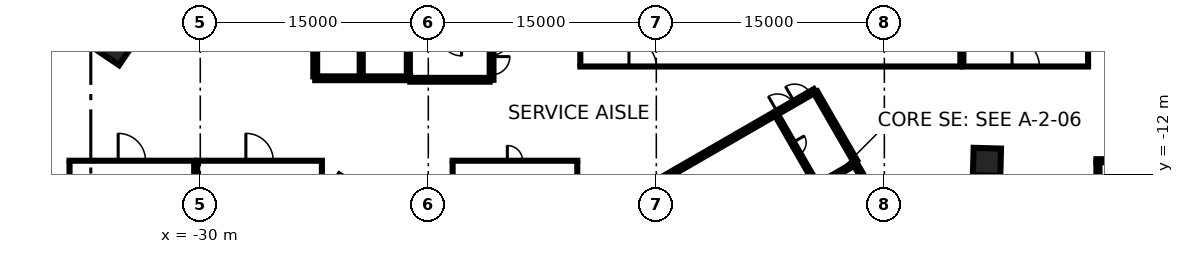
"""IFC4 building model, lengths in metres.
Left out: names, types, materials, properties, quantities, classifications, styles, units other than length and angle.
Written with IfcOpenShell. Run it as: python <this file> out.ifc"""

import sys

from ifc_helpers import new_model, si_unit, direction, frame, frame_2d, origin, origin_2d, place, context, subcontext, project, spatial, rectangle, extrude, element, fill, save


model = new_model("IFC4")
c1 = context("Model", 3, precision=1e-05, world=origin(), true_north=direction((0.0, 1.0)))
c2 = subcontext(c1, "Body", "Model", "MODEL_VIEW")
j1 = project(units=[si_unit("LENGTHUNIT", "METRE"), si_unit("PLANEANGLEUNIT", "RADIAN")], contexts=[c1])
p1 = place(None, origin())
s1 = spatial("IfcSite", under=j1, at=p1, CompositionType="ELEMENT")
p2 = place(p1, origin())
s2 = spatial("IfcBuilding", under=s1, at=p2, CompositionType="ELEMENT")
p3 = place(p2, frame((0.0, 0.0, -7.2)))
s3 = spatial("IfcBuildingStorey", under=s2, at=p3, CompositionType="ELEMENT", Elevation=-7.2)
for number, where, z_axis, x_axis in (
    (1, (21.749, -11.174, -0.4), (0.0, 0.0, 1.0), (-1.0, 0.027, 0.0)),
    (2, (-35.583, -3.565, -0.4), (0.0, 0.0, 1.0), (0.559, 0.829, 0.0)),
):
    element("IfcColumn", number, at=place(p3, frame(where, z_axis=z_axis, x_axis=x_axis)), inside=s3, PredefinedType="COLUMN", context=c2, shape_type="SweptSolid", body=[
        extrude(rectangle(XDim=1.8, YDim=1.8, at=origin_2d()), origin(), (0.0, 0.0, 1.0), 3.6),
    ])
p4 = place(p3, frame((-10.837, 5.775, 0.0), z_axis=(0.0, 0.0, 1.0), x_axis=(0.0, -1.0, 0.0)))
e3 = element("IfcWall", 3, at=p4, inside=s3, PredefinedType="SHEAR", context=c2, shape_type="SweptSolid", body=[
    extrude(rectangle(XDim=11.55, YDim=0.25, at=frame_2d((5.775, 0.0))), origin(), (0.0, 0.0, 1.0), 3.2),
])
p5 = place(p4, frame((10.025, 0.0, 0.0)))
e4 = element("IfcOpeningElement", 4, at=p5, cuts=e3, PredefinedType="OPENING", context=c2, shape_type="SweptSolid", body=[
    extrude(rectangle(XDim=1.2, YDim=2.1, at=frame_2d((0.6, 1.05))), frame((0.0, 0.135, 0.0), z_axis=(0.0, -1.0, 0.0), x_axis=(1.0, 0.0, 0.0)), (0.0, 0.0, 1.0), 0.27),
])
p6 = place(p4, frame((8.725, 0.0, 0.0)))
e5 = element("IfcOpeningElement", 5, at=p6, cuts=e3, PredefinedType="OPENING", context=c2, shape_type="SweptSolid", body=[
    extrude(rectangle(XDim=1.2, YDim=2.1, at=frame_2d((0.6, 1.05))), frame((0.0, 0.135, 0.0), z_axis=(0.0, -1.0, 0.0), x_axis=(1.0, 0.0, 0.0)), (0.0, 0.0, 1.0), 0.27),
])
p7 = place(p3, frame((-16.187, -5.675, 0.0), z_axis=(0.0, 0.0, 1.0), x_axis=(-1.0, 0.0, 0.0)))
e6 = element("IfcWall", 6, at=p7, inside=s3, PredefinedType="SHEAR", context=c2, shape_type="SweptSolid", body=[
    extrude(rectangle(XDim=6.25, YDim=0.25, at=frame_2d((3.125, 0.0))), origin(), (0.0, 0.0, 1.0), 3.2),
])
p8 = place(p3, frame((-10.963, -5.775, 0.0), z_axis=(0.0, 0.0, 1.0), x_axis=(-1.0, 0.0, 0.0)))
e7 = element("IfcWall", 7, at=p8, inside=s3, PredefinedType="SHEAR", context=c2, shape_type="SweptSolid", body=[
    extrude(rectangle(XDim=5.225, YDim=0.25, at=frame_2d((2.612, 0.0))), origin(), (0.0, 0.0, 1.0), 3.2),
])
p9 = place(p3, frame((-22.437, -5.55, 0.0), z_axis=(0.0, 0.0, 1.0), x_axis=(0.0, 1.0, 0.0)))
e8 = element("IfcWall", 8, at=p9, inside=s3, PredefinedType="SHEAR", context=c2, shape_type="SweptSolid", body=[
    extrude(rectangle(XDim=1.849, YDim=0.25, at=frame_2d((0.925, 0.0))), origin(), (0.0, 0.0, 1.0), 3.2),
])
p10 = place(p3, frame((-16.312, -2.807, 0.0), z_axis=(0.0, 0.0, 1.0), x_axis=(0.0, -1.0, 0.0)))
e9 = element("IfcWall", 9, at=p10, inside=s3, PredefinedType="SHEAR", context=c2, shape_type="SweptSolid", body=[
    extrude(rectangle(XDim=2.742, YDim=0.2, at=frame_2d((1.371, 0.0))), origin(), (0.0, 0.0, 1.0), 3.2),
])
p11 = place(p10, frame((0.743, 0.0, 0.0)))
e10 = element("IfcOpeningElement", 10, at=p11, cuts=e9, PredefinedType="OPENING", context=c2, shape_type="SweptSolid", body=[
    extrude(rectangle(XDim=1.3, YDim=2.1, at=frame_2d((0.65, 1.05))), frame((0.0, 0.11, 0.0), z_axis=(0.0, -1.0, 0.0), x_axis=(1.0, 0.0, 0.0)), (0.0, 0.0, 1.0), 0.22),
])
p12 = place(p3, frame((-19.412, -5.549, 0.0), z_axis=(0.0, 0.0, 1.0), x_axis=(0.0, 1.0, 0.0)))
e11 = element("IfcWall", 11, at=p12, inside=s3, PredefinedType="SHEAR", context=c2, shape_type="SweptSolid", body=[
    extrude(rectangle(XDim=2.799, YDim=0.2, at=frame_2d((1.399, 0.0))), origin(), (0.0, 0.0, 1.0), 3.2),
])
p13 = place(p3, frame((0.417, -12.273, 0.0), z_axis=(0.0, 0.0, 1.0), x_axis=(0.866021906294, 0.500006057782, 0.0)))
e12 = element("IfcWall", 12, at=p13, inside=s3, PredefinedType="SHEAR", context=c2, shape_type="SweptSolid", body=[
    extrude(rectangle(XDim=11.55, YDim=0.25, at=frame_2d((5.775, 0.0))), origin(), (0.0, 0.0, 1.0), 3.2),
])
p14 = place(p13, frame((10.025, 0.0, 0.0)))
e13 = element("IfcOpeningElement", 13, at=p14, cuts=e12, PredefinedType="OPENING", context=c2, shape_type="SweptSolid", body=[
    extrude(rectangle(XDim=1.2, YDim=2.1, at=frame_2d((0.6, 1.05))), frame((0.0, 0.135, 0.0), z_axis=(0.0, -1.0, 0.0), x_axis=(1.0, 0.0, 0.0)), (0.0, 0.0, 1.0), 0.27),
])
p15 = place(p13, frame((8.725, 0.0, 0.0)))
e14 = element("IfcOpeningElement", 14, at=p15, cuts=e12, PredefinedType="OPENING", context=c2, shape_type="SweptSolid", body=[
    extrude(rectangle(XDim=1.2, YDim=2.1, at=frame_2d((0.6, 1.05))), frame((0.0, 0.135, 0.0), z_axis=(0.0, -1.0, 0.0), x_axis=(1.0, 0.0, 0.0)), (0.0, 0.0, 1.0), 0.27),
])
p16 = place(p3, frame((13.008, -11.181, 0.0), z_axis=(0.0, 0.0, 1.0), x_axis=(0.500004234368, -0.866022959057, 0.0)))
e15 = element("IfcWall", 15, at=p16, inside=s3, PredefinedType="SHEAR", context=c2, shape_type="SweptSolid", body=[
    extrude(rectangle(XDim=6.25, YDim=0.25, at=frame_2d((3.125, 0.0))), origin(), (0.0, 0.0, 1.0), 3.2),
])
p17 = place(p3, frame((10.483, -6.606, 0.0), z_axis=(0.0, 0.0, 1.0), x_axis=(0.49999885962, -0.866026062182, 0.0)))
e16 = element("IfcWall", 16, at=p17, inside=s3, PredefinedType="SHEAR", context=c2, shape_type="SweptSolid", body=[
    extrude(rectangle(XDim=5.225, YDim=0.25, at=frame_2d((2.612, 0.0))), origin(), (0.0, 0.0, 1.0), 3.2),
])
p18 = place(p3, frame((7.906, -8.094, 0.0), z_axis=(0.0, 0.0, 1.0), x_axis=(0.500012186204, -0.866018367962, 0.0)))
e17 = element("IfcWall", 17, at=p18, inside=s3, PredefinedType="SHEAR", context=c2, shape_type="SweptSolid", body=[
    extrude(rectangle(XDim=5.349, YDim=0.2, at=frame_2d((2.674, 0.0))), origin(), (0.0, 0.0, 1.0), 3.2),
])
p19 = place(p18, frame((2.099, 0.0, 0.0)))
e18 = element("IfcOpeningElement", 18, at=p19, cuts=e17, PredefinedType="OPENING", context=c2, shape_type="SweptSolid", body=[
    extrude(rectangle(XDim=0.9, YDim=2.1, at=frame_2d((0.45, 1.05))), frame((0.0, 0.11, 0.0), z_axis=(0.0, -1.0, 0.0), x_axis=(1.0, 0.0, 0.0)), (0.0, 0.0, 1.0), 0.22),
])
p20 = place(p3, frame((10.668, -12.677, 0.0), z_axis=(0.0, 0.0, 1.0), x_axis=(0.866016748302, 0.500014991436, 0.0)))
e19 = element("IfcWall", 19, at=p20, inside=s3, PredefinedType="SHEAR", context=c2, shape_type="SweptSolid", body=[
    extrude(rectangle(XDim=2.649, YDim=0.2, at=frame_2d((1.324, 0.0))), origin(), (0.0, 0.0, 1.0), 3.2),
])
p21 = place(p20, frame((0.65, 0.0, 0.0)))
e20 = element("IfcOpeningElement", 20, at=p21, cuts=e19, PredefinedType="OPENING", context=c2, shape_type="SweptSolid", body=[
    extrude(rectangle(XDim=1.3, YDim=2.1, at=frame_2d((0.65, 1.05))), frame((0.0, 0.11, 0.0), z_axis=(0.0, -1.0, 0.0), x_axis=(1.0, 0.0, 0.0)), (0.0, 0.0, 1.0), 0.22),
])
p22 = place(p3, frame((-38.7, -11.1, 0.0), z_axis=(0.0, 0.0, 1.0), x_axis=(1.0, 0.0, 0.0)))
e21 = element("IfcWall", 21, at=p22, inside=s3, PredefinedType="PARTITIONING", context=c2, shape_type="SweptSolid", body=[
    extrude(rectangle(XDim=8.4, YDim=0.2, at=frame_2d((4.2, 0.0))), origin(), (0.0, 0.0, 1.0), 3.2),
])
p23 = place(p22, frame((3.3, 0.0, 0.0)))
e22 = element("IfcOpeningElement", 22, at=p23, cuts=e21, PredefinedType="OPENING", context=c2, shape_type="SweptSolid", body=[
    extrude(rectangle(XDim=1.8, YDim=2.1, at=frame_2d((0.9, 1.05))), frame((0.0, 0.11, 0.0), z_axis=(0.0, -1.0, 0.0), x_axis=(1.0, 0.0, 0.0)), (0.0, 0.0, 1.0), 0.22),
])
p24 = place(p3, frame((-38.6, -15.4, 0.0), z_axis=(0.0, 0.0, 1.0), x_axis=(0.0, 1.0, 0.0)))
e23 = element("IfcWall", 23, at=p24, inside=s3, PredefinedType="PARTITIONING", context=c2, shape_type="SweptSolid", body=[
    extrude(rectangle(XDim=4.2, YDim=0.2, at=frame_2d((2.1, 0.0))), origin(), (0.0, 0.0, 1.0), 3.2),
])
p25 = place(p3, frame((-30.4, -15.6, 0.0), z_axis=(0.0, 0.0, 1.0), x_axis=(0.0, 1.0, 0.0)))
e24 = element("IfcWall", 24, at=p25, inside=s3, PredefinedType="PARTITIONING", context=c2, shape_type="SweptSolid", body=[
    extrude(rectangle(XDim=4.4, YDim=0.2, at=frame_2d((2.2, 0.0))), origin(), (0.0, 0.0, 1.0), 3.2),
])
p26 = place(p3, frame((-30.3, -11.1, 0.0), z_axis=(0.0, 0.0, 1.0), x_axis=(1.0, 0.0, 0.0)))
e25 = element("IfcWall", 25, at=p26, inside=s3, PredefinedType="PARTITIONING", context=c2, shape_type="SweptSolid", body=[
    extrude(rectangle(XDim=8.4, YDim=0.2, at=frame_2d((4.2, 0.0))), origin(), (0.0, 0.0, 1.0), 3.2),
])
p27 = place(p26, frame((3.3, 0.0, 0.0)))
e26 = element("IfcOpeningElement", 26, at=p27, cuts=e25, PredefinedType="OPENING", context=c2, shape_type="SweptSolid", body=[
    extrude(rectangle(XDim=1.8, YDim=2.1, at=frame_2d((0.9, 1.05))), frame((0.0, 0.11, 0.0), z_axis=(0.0, -1.0, 0.0), x_axis=(1.0, 0.0, 0.0)), (0.0, 0.0, 1.0), 0.22),
])
p28 = place(p3, frame((-30.2, -15.6, 0.0), z_axis=(0.0, 0.0, 1.0), x_axis=(0.0, 1.0, 0.0)))
e27 = element("IfcWall", 27, at=p28, inside=s3, PredefinedType="PARTITIONING", context=c2, shape_type="SweptSolid", body=[
    extrude(rectangle(XDim=4.4, YDim=0.2, at=frame_2d((2.2, 0.0))), origin(), (0.0, 0.0, 1.0), 3.2),
])
p29 = place(p3, frame((-22.0, -15.4, 0.0), z_axis=(0.0, 0.0, 1.0), x_axis=(0.0, 1.0, 0.0)))
e28 = element("IfcWall", 28, at=p29, inside=s3, PredefinedType="PARTITIONING", context=c2, shape_type="SweptSolid", body=[
    extrude(rectangle(XDim=4.2, YDim=0.2, at=frame_2d((2.1, 0.0))), origin(), (0.0, 0.0, 1.0), 3.2),
])
p30 = place(p3, frame((-13.5, -11.1, 0.0), z_axis=(0.0, 0.0, 1.0), x_axis=(1.0, 0.0, 0.0)))
e29 = element("IfcWall", 29, at=p30, inside=s3, PredefinedType="PARTITIONING", context=c2, shape_type="SweptSolid", body=[
    extrude(rectangle(XDim=8.4, YDim=0.2, at=frame_2d((4.2, 0.0))), origin(), (0.0, 0.0, 1.0), 3.2),
])
p31 = place(p30, frame((3.7, 0.0, 0.0)))
e30 = element("IfcOpeningElement", 30, at=p31, cuts=e29, PredefinedType="OPENING", context=c2, shape_type="SweptSolid", body=[
    extrude(rectangle(XDim=1.0, YDim=2.1, at=frame_2d((0.5, 1.05))), frame((0.0, 0.11, 0.0), z_axis=(0.0, -1.0, 0.0), x_axis=(1.0, 0.0, 0.0)), (0.0, 0.0, 1.0), 0.22),
])
for number, where, z_axis, x_axis in (
    (31, (-13.4, -15.4, 0.0), (0.0, 0.0, 1.0), (0.0, 1.0, 0.0)),
    (32, (-5.2, -15.4, 0.0), (0.0, 0.0, 1.0), (0.0, 1.0, 0.0)),
):
    element("IfcWall", number, at=place(p3, frame(where, z_axis=z_axis, x_axis=x_axis)), inside=s3, PredefinedType="PARTITIONING", context=c2, shape_type="SweptSolid", body=[
        extrude(rectangle(XDim=4.2, YDim=0.2, at=frame_2d((2.1, 0.0))), origin(), (0.0, 0.0, 1.0), 3.2),
    ])
p32 = place(p3, frame((-5.1, -4.9, 0.0), z_axis=(0.0, 0.0, 1.0), x_axis=(1.0, 0.0, 0.0)))
e33 = element("IfcWall", 33, at=p32, inside=s3, PredefinedType="PARTITIONING", context=c2, shape_type="SweptSolid", body=[
    extrude(rectangle(XDim=25.2, YDim=0.2, at=frame_2d((12.6, 0.0))), origin(), (0.0, 0.0, 1.0), 3.2),
])
p33 = place(p32, frame((3.3, 0.0, 0.0)))
e34 = element("IfcOpeningElement", 34, at=p33, cuts=e33, PredefinedType="OPENING", context=c2, shape_type="SweptSolid", body=[
    extrude(rectangle(XDim=1.8, YDim=2.1, at=frame_2d((0.9, 1.05))), frame((0.0, 0.11, 0.0), z_axis=(0.0, -1.0, 0.0), x_axis=(1.0, 0.0, 0.0)), (0.0, 0.0, 1.0), 0.22),
])
for number, where, z_axis, x_axis in (
    (35, (-5.0, -4.8, 0.0), (0.0, 0.0, 1.0), (0.0, 1.0, 0.0)),
    (36, (20.0, -4.8, 0.0), (0.0, 0.0, 1.0), (0.0, 1.0, 0.0)),
):
    element("IfcWall", number, at=place(p3, frame(where, z_axis=z_axis, x_axis=x_axis)), inside=s3, PredefinedType="PARTITIONING", context=c2, shape_type="SweptSolid", body=[
        extrude(rectangle(XDim=4.2, YDim=0.2, at=frame_2d((2.1, 0.0))), origin(), (0.0, 0.0, 1.0), 3.2),
    ])
p34 = place(p3, frame((20.1, -4.9, 0.0), z_axis=(0.0, 0.0, 1.0), x_axis=(1.0, 0.0, 0.0)))
e37 = element("IfcWall", 37, at=p34, inside=s3, PredefinedType="PARTITIONING", context=c2, shape_type="SweptSolid", body=[
    extrude(rectangle(XDim=8.4, YDim=0.2, at=frame_2d((4.2, 0.0))), origin(), (0.0, 0.0, 1.0), 3.2),
])
p35 = place(p34, frame((3.3, 0.0, 0.0)))
e38 = element("IfcOpeningElement", 38, at=p35, cuts=e37, PredefinedType="OPENING", context=c2, shape_type="SweptSolid", body=[
    extrude(rectangle(XDim=1.8, YDim=2.1, at=frame_2d((0.9, 1.05))), frame((0.0, 0.11, 0.0), z_axis=(0.0, -1.0, 0.0), x_axis=(1.0, 0.0, 0.0)), (0.0, 0.0, 1.0), 0.22),
])
p36 = place(p3, frame((20.2, -4.8, 0.0), z_axis=(0.0, 0.0, 1.0), x_axis=(0.0, 1.0, 0.0)))
e39 = element("IfcWall", 39, at=p36, inside=s3, PredefinedType="PARTITIONING", context=c2, shape_type="SweptSolid", body=[
    extrude(rectangle(XDim=4.2, YDim=0.2, at=frame_2d((2.1, 0.0))), origin(), (0.0, 0.0, 1.0), 3.2),
])
p37 = place(p3, frame((28.4, -4.8, 0.0), z_axis=(0.0, 0.0, 1.0), x_axis=(0.0, 1.0, 0.0)))
e40 = element("IfcWall", 40, at=p37, inside=s3, PredefinedType="PARTITIONING", context=c2, shape_type="SweptSolid", body=[
    extrude(rectangle(XDim=4.4, YDim=0.2, at=frame_2d((2.2, 0.0))), origin(), (0.0, 0.0, 1.0), 3.2),
])
p38 = place(p3, frame((29.05, -20.8, 0.0), z_axis=(0.0, 0.0, 1.0), x_axis=(0.0, 1.0, 0.0)))
e41 = element("IfcWall", 41, at=p38, inside=s3, PredefinedType="SOLIDWALL", context=c2, shape_type="SweptSolid", body=[
    extrude(rectangle(XDim=9.6, YDim=0.2, at=frame_2d((4.8, 0.0))), origin(), (0.0, 0.0, 1.0), 3.2),
])
p39 = place(p3, frame((28.95, -11.1, 0.0), z_axis=(0.0, 0.0, 1.0), x_axis=(1.0, 0.0, 0.0)))
e42 = element("IfcWall", 42, at=p39, inside=s3, PredefinedType="SOLIDWALL", context=c2, shape_type="SweptSolid", body=[
    extrude(rectangle(XDim=4.55, YDim=0.2, at=frame_2d((2.275, 0.0))), origin(), (0.0, 0.0, 1.0), 3.2),
])
p40 = place(p11, origin())
e43 = element("IfcDoor", 43, at=p40, inside=s3, OperationType="SLIDING_TO_LEFT", PredefinedType="DOOR", context=c2, shape_type="SweptSolid", body=[
    extrude(rectangle(XDim=1.3, YDim=2.1, at=frame_2d((0.65, 1.05))), frame((0.0, 0.025, 0.0), z_axis=(0.0, -1.0, 0.0), x_axis=(1.0, 0.0, 0.0)), (0.0, 0.0, 1.0), 0.05),
])
fill(e10, e43)
p41 = place(p5, origin())
e44 = element("IfcDoor", 44, at=p41, inside=s3, OperationType="SINGLE_SWING_LEFT", PredefinedType="DOOR", context=c2, shape_type="SweptSolid", body=[
    extrude(rectangle(XDim=1.2, YDim=2.1, at=frame_2d((0.6, 1.05))), frame((0.0, 0.025, 0.0), z_axis=(0.0, -1.0, 0.0), x_axis=(1.0, 0.0, 0.0)), (0.0, 0.0, 1.0), 0.05),
])
fill(e4, e44)
p42 = place(p6, origin())
e45 = element("IfcDoor", 45, at=p42, inside=s3, OperationType="SINGLE_SWING_RIGHT", PredefinedType="DOOR", context=c2, shape_type="SweptSolid", body=[
    extrude(rectangle(XDim=1.2, YDim=2.1, at=frame_2d((0.6, 1.05))), frame((0.0, 0.025, 0.0), z_axis=(0.0, -1.0, 0.0), x_axis=(1.0, 0.0, 0.0)), (0.0, 0.0, 1.0), 0.05),
])
fill(e5, e45)
p43 = place(p21, origin())
e46 = element("IfcDoor", 46, at=p43, inside=s3, OperationType="SLIDING_TO_RIGHT", PredefinedType="DOOR", context=c2, shape_type="SweptSolid", body=[
    extrude(rectangle(XDim=1.3, YDim=2.1, at=frame_2d((0.65, 1.05))), frame((0.0, 0.025, 0.0), z_axis=(0.0, -1.0, 0.0), x_axis=(1.0, 0.0, 0.0)), (0.0, 0.0, 1.0), 0.05),
])
fill(e20, e46)
p44 = place(p14, origin())
e47 = element("IfcDoor", 47, at=p44, inside=s3, OperationType="SINGLE_SWING_LEFT", PredefinedType="DOOR", context=c2, shape_type="SweptSolid", body=[
    extrude(rectangle(XDim=1.2, YDim=2.1, at=frame_2d((0.6, 1.05))), frame((0.0, 0.025, 0.0), z_axis=(0.0, -1.0, 0.0), x_axis=(1.0, 0.0, 0.0)), (0.0, 0.0, 1.0), 0.05),
])
fill(e13, e47)
p45 = place(p15, origin())
e48 = element("IfcDoor", 48, at=p45, inside=s3, OperationType="SINGLE_SWING_RIGHT", PredefinedType="DOOR", context=c2, shape_type="SweptSolid", body=[
    extrude(rectangle(XDim=1.2, YDim=2.1, at=frame_2d((0.6, 1.05))), frame((0.0, 0.025, 0.0), z_axis=(0.0, -1.0, 0.0), x_axis=(1.0, 0.0, 0.0)), (0.0, 0.0, 1.0), 0.05),
])
fill(e14, e48)
p46 = place(p19, origin())
e49 = element("IfcDoor", 49, at=p46, inside=s3, OperationType="SINGLE_SWING_RIGHT", PredefinedType="DOOR", context=c2, shape_type="SweptSolid", body=[
    extrude(rectangle(XDim=0.9, YDim=2.1, at=frame_2d((0.45, 1.05))), frame((0.0, 0.025, 0.0), z_axis=(0.0, -1.0, 0.0), x_axis=(1.0, 0.0, 0.0)), (0.0, 0.0, 1.0), 0.05),
])
fill(e18, e49)
p47 = place(p23, origin())
e50 = element("IfcDoor", 50, at=p47, inside=s3, OperationType="DOUBLE_DOOR_SINGLE_SWING", PredefinedType="DOOR", context=c2, shape_type="SweptSolid", body=[
    extrude(rectangle(XDim=1.8, YDim=2.1, at=frame_2d((0.9, 1.05))), frame((0.0, 0.025, 0.0), z_axis=(0.0, -1.0, 0.0), x_axis=(1.0, 0.0, 0.0)), (0.0, 0.0, 1.0), 0.05),
])
fill(e22, e50)
p48 = place(p27, origin())
e51 = element("IfcDoor", 51, at=p48, inside=s3, OperationType="DOUBLE_DOOR_SINGLE_SWING", PredefinedType="DOOR", context=c2, shape_type="SweptSolid", body=[
    extrude(rectangle(XDim=1.8, YDim=2.1, at=frame_2d((0.9, 1.05))), frame((0.0, 0.025, 0.0), z_axis=(0.0, -1.0, 0.0), x_axis=(1.0, 0.0, 0.0)), (0.0, 0.0, 1.0), 0.05),
])
fill(e26, e51)
p49 = place(p31, origin())
e52 = element("IfcDoor", 52, at=p49, inside=s3, OperationType="SINGLE_SWING_LEFT", PredefinedType="DOOR", context=c2, shape_type="SweptSolid", body=[
    extrude(rectangle(XDim=1.0, YDim=2.1, at=frame_2d((0.5, 1.05))), frame((0.0, 0.025, 0.0), z_axis=(0.0, -1.0, 0.0), x_axis=(1.0, 0.0, 0.0)), (0.0, 0.0, 1.0), 0.05),
])
fill(e30, e52)
p50 = place(p33, origin())
e53 = element("IfcDoor", 53, at=p50, inside=s3, OperationType="DOUBLE_DOOR_SINGLE_SWING", PredefinedType="DOOR", context=c2, shape_type="SweptSolid", body=[
    extrude(rectangle(XDim=1.8, YDim=2.1, at=frame_2d((0.9, 1.05))), frame((0.0, 0.025, 0.0), z_axis=(0.0, -1.0, 0.0), x_axis=(1.0, 0.0, 0.0)), (0.0, 0.0, 1.0), 0.05),
])
fill(e34, e53)
p51 = place(p35, origin())
e54 = element("IfcDoor", 54, at=p51, inside=s3, OperationType="DOUBLE_DOOR_SINGLE_SWING", PredefinedType="DOOR", context=c2, shape_type="SweptSolid", body=[
    extrude(rectangle(XDim=1.8, YDim=2.1, at=frame_2d((0.9, 1.05))), frame((0.0, 0.025, 0.0), z_axis=(0.0, -1.0, 0.0), x_axis=(1.0, 0.0, 0.0)), (0.0, 0.0, 1.0), 0.05),
])
fill(e38, e54)
save(model, sys.argv[1])
